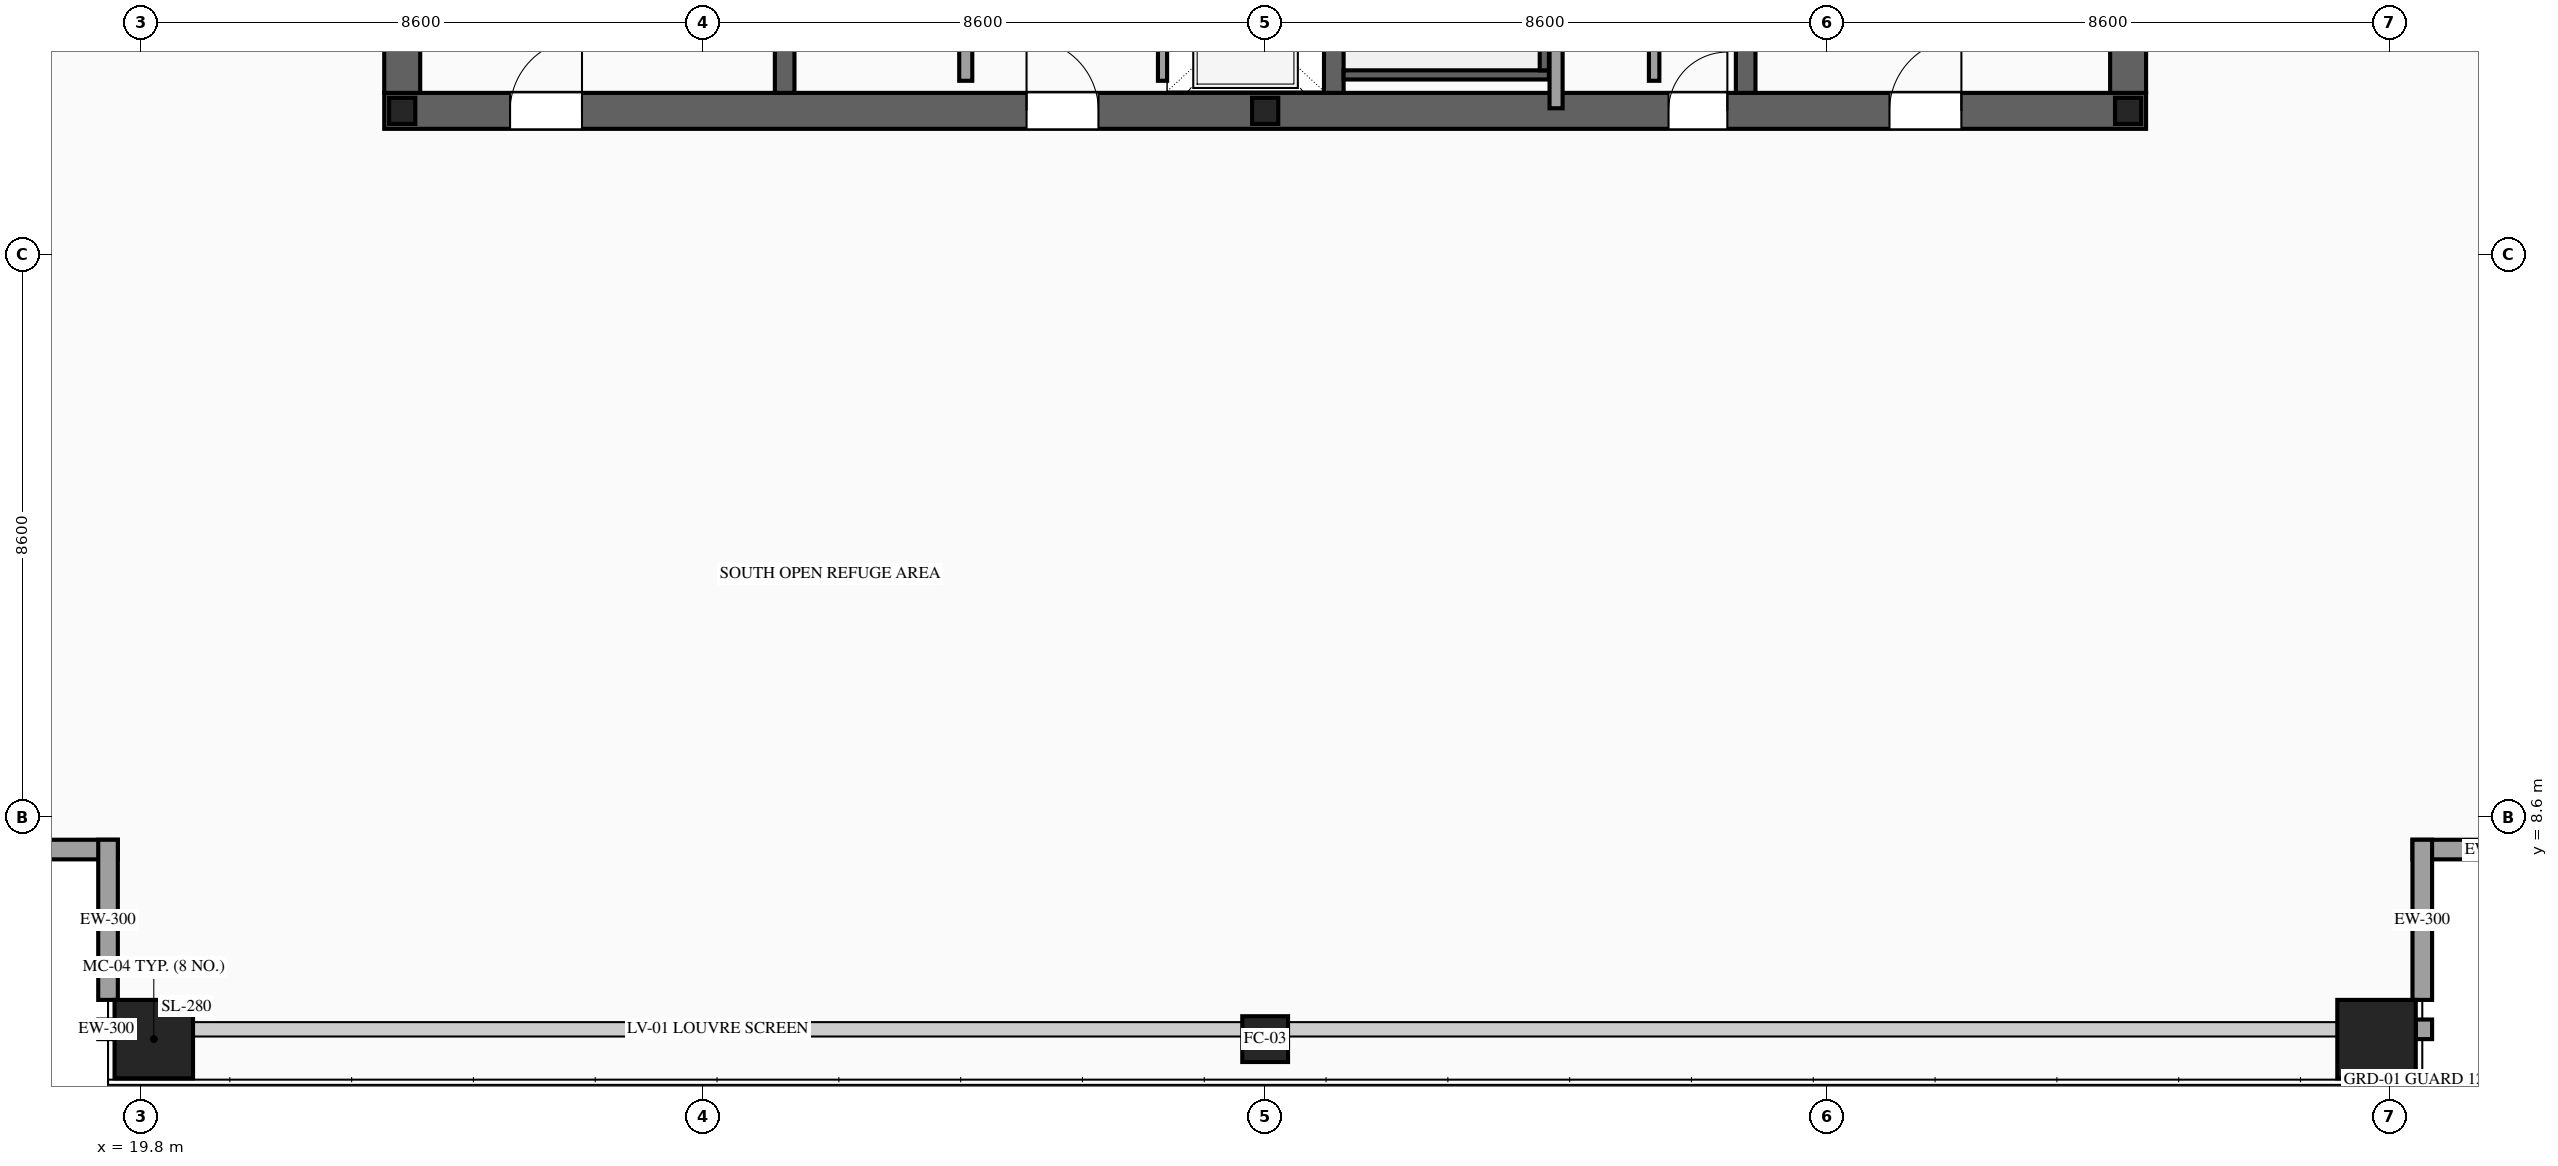
"""IFC4 building model, lengths in metres.
Left out: names, types, materials, properties, quantities, classifications, styles, units other than length and angle.
Written with IfcOpenShell. Run it as: python <this file> out.ifc"""

import sys

from ifc_helpers import new_model, si_unit, direction, frame, frame_2d, origin, origin_2d, place, context, subcontext, project, spatial, rectangle, hollow_rectangle, i_section, extrude, source, transform, mapped, element, fill, save


model = new_model("IFC4")
c1 = context("Model", 3, precision=1e-05, world=origin(), true_north=direction((0.0, 1.0)))
c2 = subcontext(c1, "Body", "Model", "MODEL_VIEW")
j1 = project(units=[si_unit("LENGTHUNIT", "METRE"), si_unit("PLANEANGLEUNIT", "RADIAN")], contexts=[c1])
p1 = place(None, origin())
s1 = spatial("IfcSite", under=j1, at=p1, CompositionType="ELEMENT")
p2 = place(p1, origin())
s2 = spatial("IfcBuilding", under=s1, at=p2, CompositionType="ELEMENT")
p3 = place(p2, frame((0.0, 0.0, 219.5)))
s3 = spatial("IfcBuildingStorey", under=s2, at=p3, CompositionType="ELEMENT", Elevation=219.5)
p4 = place(p3, frame((23.525, 19.4, 0.0), z_axis=(0.0, 0.0, 1.0), x_axis=(1.0, 0.0, 0.0)))
e1 = element("IfcWall", 1, at=p4, inside=s3, PredefinedType="SHEAR", context=c2, shape_type="SweptSolid", body=[
    extrude(rectangle(XDim=26.95, YDim=0.55, at=frame_2d((13.475, 0.0))), origin(), (0.0, 0.0, 1.0), 4.6),
])
p5 = place(p4, frame((1.925, 0.0, 0.0)))
e2 = element("IfcOpeningElement", 2, at=p5, cuts=e1, PredefinedType="OPENING", context=c2, shape_type="SweptSolid", body=[
    extrude(rectangle(XDim=1.1, YDim=2.2, at=frame_2d((0.55, 1.1))), frame((0.0, 0.29, 0.0), z_axis=(0.0, -1.0, 0.0), x_axis=(1.0, 0.0, 0.0)), (0.0, 0.0, 1.0), 0.58),
])
p6 = place(p4, frame((9.825, 0.0, 0.0)))
e3 = element("IfcOpeningElement", 3, at=p6, cuts=e1, PredefinedType="OPENING", context=c2, shape_type="SweptSolid", body=[
    extrude(rectangle(XDim=1.1, YDim=2.2, at=frame_2d((0.55, 1.1))), frame((0.0, 0.29, 0.0), z_axis=(0.0, -1.0, 0.0), x_axis=(1.0, 0.0, 0.0)), (0.0, 0.0, 1.0), 0.58),
])
p7 = place(p4, frame((23.025, 0.0, 0.0)))
e4 = element("IfcOpeningElement", 4, at=p7, cuts=e1, PredefinedType="OPENING", context=c2, shape_type="SweptSolid", body=[
    extrude(rectangle(XDim=1.1, YDim=2.2, at=frame_2d((0.55, 1.1))), frame((0.0, 0.29, 0.0), z_axis=(0.0, -1.0, 0.0), x_axis=(1.0, 0.0, 0.0)), (0.0, 0.0, 1.0), 0.58),
])
p8 = place(p4, frame((19.645, 0.0, 0.0)))
e5 = element("IfcOpeningElement", 5, at=p8, cuts=e1, PredefinedType="OPENING", context=c2, shape_type="SweptSolid", body=[
    extrude(rectangle(XDim=0.9, YDim=2.15, at=frame_2d((0.45, 1.075))), frame((0.0, 0.29, 0.0), z_axis=(0.0, -1.0, 0.0), x_axis=(1.0, 0.0, 0.0)), (0.0, 0.0, 1.0), 0.58),
])
m1 = source(origin(), c2, "Body", "SweptSolid", [
    extrude(rectangle(XDim=12.25, YDim=0.55, at=frame_2d((6.125, 0.0))), origin(), (0.0, 0.0, 1.0), 4.6),
])
for number, where, z_axis, x_axis in (
    (6, (23.8, 19.675, 0.0), (0.0, 0.0, 1.0), (0.0, 1.0, 0.0)),
    (7, (50.2, 19.675, 0.0), (0.0, 0.0, 1.0), (0.0, 1.0, 0.0)),
):
    element("IfcWall", number, at=place(p3, frame(where, z_axis=z_axis, x_axis=x_axis)), inside=s3, PredefinedType="SHEAR", context=c2, shape_type="MappedRepresentation", body=[
        mapped(m1, transform((0.0, 0.0, 0.0), scale=1.0)),
    ])
m2 = source(origin(), c2, "Body", "SweptSolid", [
    extrude(rectangle(XDim=12.25, YDim=0.3, at=frame_2d((6.125, 0.0))), origin(), (0.0, 0.0, 1.0), 4.6),
])
for number, where, z_axis, x_axis in (
    (8, (29.65, 19.675, 0.0), (0.0, 0.0, 1.0), (0.0, 1.0, 0.0)),
    (9, (38.05, 19.675, 0.0), (0.0, 0.0, 1.0), (0.0, 1.0, 0.0)),
    (10, (44.35, 19.675, 0.0), (0.0, 0.0, 1.0), (0.0, 1.0, 0.0)),
):
    element("IfcWall", number, at=place(p3, frame(where, z_axis=z_axis, x_axis=x_axis)), inside=s3, PredefinedType="SOLIDWALL", context=c2, shape_type="MappedRepresentation", body=[
        mapped(m2, transform((0.0, 0.0, 0.0), scale=1.0)),
    ])
m3 = source(origin(), c2, "Body", "SweptSolid", [
    extrude(i_section(OverallWidth=0.4, OverallDepth=0.4, WebThickness=0.013, FlangeThickness=0.021, at=origin_2d()), origin(), (0.0, 0.0, 1.0), 4.6),
])
for number, where, z_axis, x_axis in (
    (11, (23.8, 19.4, 0.0), (0.0, 0.0, 1.0), (1.0, 0.0, 0.0)),
    (12, (37.0, 19.4, 0.0), (0.0, 0.0, 1.0), (1.0, 0.0, 0.0)),
    (13, (50.2, 19.4, 0.0), (0.0, 0.0, 1.0), (1.0, 0.0, 0.0)),
):
    element("IfcColumn", number, at=place(p3, frame(where, z_axis=z_axis, x_axis=x_axis)), inside=s3, PredefinedType="COLUMN", context=c2, shape_type="MappedRepresentation", body=[
        mapped(m3, transform((0.0, 0.0, 0.0), scale=1.0)),
    ])
m4 = source(origin(), c2, "Body", "SweptSolid", [
    extrude(hollow_rectangle(XDim=1.2, YDim=1.2, WallThickness=0.055, at=origin_2d()), origin(), (0.0, 0.0, 1.0), 4.6),
])
p9 = place(p3, frame((20.0, 5.2, 0.0), z_axis=(0.0, 0.0, 1.0), x_axis=(1.0, 0.0, 0.0)))
e14 = element("IfcColumn", 14, at=p9, inside=s3, PredefinedType="COLUMN", context=c2, shape_type="MappedRepresentation", body=[
    mapped(m4, transform((0.0, 0.0, 0.0), scale=1.0)),
])
m5 = source(origin(), c2, "Body", "SweptSolid", [
    extrude(hollow_rectangle(XDim=0.7, YDim=0.7, WallThickness=0.032, at=origin_2d()), origin(), (0.0, 0.0, 1.0), 4.6),
])
p10 = place(p3, frame((37.0, 5.2, 0.0), z_axis=(0.0, 0.0, 1.0), x_axis=(1.0, 0.0, 0.0)))
e15 = element("IfcColumn", 15, at=p10, inside=s3, PredefinedType="COLUMN", context=c2, shape_type="MappedRepresentation", body=[
    mapped(m5, transform((0.0, 0.0, 0.0), scale=1.0)),
])
p11 = place(p3, frame((54.0, 5.2, 0.0), z_axis=(0.0, 0.0, 1.0), x_axis=(1.0, 0.0, 0.0)))
e16 = element("IfcColumn", 16, at=p11, inside=s3, PredefinedType="COLUMN", context=c2, shape_type="MappedRepresentation", body=[
    mapped(m4, transform((0.0, 0.0, 0.0), scale=1.0)),
])
m6 = source(origin(), c2, "Body", "SweptSolid", [
    extrude(rectangle(XDim=2.45, YDim=0.3, at=frame_2d((1.225, 0.0))), origin(), (0.0, 0.0, 1.0), 4.38),
])
for number, where, z_axis, x_axis in (
    (17, (17.0, 8.1, 0.0), (0.0, 0.0, 1.0), (1.0, 0.0, 0.0)),
    (18, (19.3, 8.25, 0.0), (0.0, 0.0, 1.0), (0.0, -1.0, 0.0)),
    (19, (54.55, 8.1, 0.0), (0.0, 0.0, 1.0), (1.0, 0.0, 0.0)),
    (20, (54.7, 5.8, 0.0), (0.0, 0.0, 1.0), (0.0, 1.0, 0.0)),
):
    element("IfcWall", number, at=place(p3, frame(where, z_axis=z_axis, x_axis=x_axis)), inside=s3, PredefinedType="SOLIDWALL", context=c2, shape_type="MappedRepresentation", body=[
        mapped(m6, transform((0.0, 0.0, 0.0), scale=1.0)),
    ])
m7 = source(origin(), c2, "Body", "SweptSolid", [
    extrude(rectangle(XDim=0.25, YDim=0.3, at=frame_2d((0.125, 0.0))), origin(), (0.0, 0.0, 1.0), 4.38),
])
for number, where, z_axis, x_axis in (
    (21, (19.15, 5.35, 0.0), (0.0, 0.0, 1.0), (1.0, 0.0, 0.0)),
    (22, (54.6, 5.35, 0.0), (0.0, 0.0, 1.0), (1.0, 0.0, 0.0)),
):
    element("IfcWall", number, at=place(p3, frame(where, z_axis=z_axis, x_axis=x_axis)), inside=s3, PredefinedType="SOLIDWALL", context=c2, shape_type="MappedRepresentation", body=[
        mapped(m7, transform((0.0, 0.0, 0.0), scale=1.0)),
    ])
p12 = place(p3, frame((35.43, 19.86, 0.0), z_axis=(0.0, 0.0, 1.0), x_axis=(0.0, 1.0, 0.0)))
e23 = element("IfcWall", 23, at=p12, inside=s3, PredefinedType="SOLIDWALL", context=c2, shape_type="SweptSolid", body=[
    extrude(rectangle(XDim=2.04, YDim=0.14, at=frame_2d((1.02, 0.0))), origin(), (0.0, 0.0, 1.0), 4.38),
])
p13 = place(p12, frame((0.47, 0.0, 0.0)))
e24 = element("IfcOpeningElement", 24, at=p13, cuts=e23, PredefinedType="OPENING", context=c2, shape_type="SweptSolid", body=[
    extrude(rectangle(XDim=1.1, YDim=2.2, at=frame_2d((0.55, 1.1))), frame((0.0, 0.085, 0.0), z_axis=(0.0, -1.0, 0.0), x_axis=(1.0, 0.0, 0.0)), (0.0, 0.0, 1.0), 0.17),
])
m8 = source(origin(), c2, "Body", "SweptSolid", [
    extrude(rectangle(XDim=3.14, YDim=0.14, at=frame_2d((1.57, 0.0))), origin(), (0.0, 0.0, 1.0), 4.38),
])
p14 = place(p3, frame((38.2, 19.95, 0.0), z_axis=(0.0, 0.0, 1.0), x_axis=(1.0, 0.0, 0.0)))
e25 = element("IfcWall", 25, at=p14, inside=s3, PredefinedType="SOLIDWALL", context=c2, shape_type="MappedRepresentation", body=[
    mapped(m8, transform((0.0, 0.0, 0.0), scale=1.0)),
])
m9 = source(origin(), c2, "Body", "SweptSolid", [
    extrude(rectangle(XDim=8.94, YDim=0.14, at=frame_2d((4.47, 0.0))), origin(), (0.0, 0.0, 1.0), 4.38),
])
p15 = place(p3, frame((41.27, 20.02, 0.0), z_axis=(0.0, 0.0, 1.0), x_axis=(0.0, 1.0, 0.0)))
e26 = element("IfcWall", 26, at=p15, inside=s3, PredefinedType="SOLIDWALL", context=c2, shape_type="MappedRepresentation", body=[
    mapped(m9, transform((0.0, 0.0, 0.0), scale=1.0)),
])
p16 = place(p3, frame((32.42, 19.86, 0.0), z_axis=(0.0, 0.0, 1.0), x_axis=(0.0, 1.0, 0.0)))
e27 = element("IfcWall", 27, at=p16, inside=s3, PredefinedType="PARTITIONING", context=c2, shape_type="SweptSolid", body=[
    extrude(rectangle(XDim=11.88, YDim=0.2, at=frame_2d((5.94, 0.0))), origin(), (0.0, 0.0, 1.0), 4.38),
])
p17 = place(p16, frame((5.49, 0.0, 0.0)))
e28 = element("IfcOpeningElement", 28, at=p17, cuts=e27, PredefinedType="OPENING", context=c2, shape_type="SweptSolid", body=[
    extrude(rectangle(XDim=0.9, YDim=2.15, at=frame_2d((0.45, 1.075))), frame((0.0, 0.115, 0.0), z_axis=(0.0, -1.0, 0.0), x_axis=(1.0, 0.0, 0.0)), (0.0, 0.0, 1.0), 0.23),
])
m10 = source(origin(), c2, "Body", "SweptSolid", [
    extrude(rectangle(XDim=1.34, YDim=0.16, at=frame_2d((0.67, 0.0))), origin(), (0.0, 0.0, 1.0), 4.38),
])
p18 = place(p3, frame((42.95, 19.86, 0.0), z_axis=(0.0, 0.0, 1.0), x_axis=(0.0, 1.0, 0.0)))
e29 = element("IfcWall", 29, at=p18, inside=s3, PredefinedType="PARTITIONING", context=c2, shape_type="MappedRepresentation", body=[
    mapped(m10, transform((0.0, 0.0, 0.0), scale=1.0)),
])
m11 = source(origin(), c2, "Body", "SweptSolid", [
    extrude(rectangle(XDim=12.72, YDim=0.2, at=frame_2d((6.36, 0.0))), origin(), (0.0, 0.0, 1.0), 4.38),
])
p19 = place(p3, frame((41.45, 19.44, 0.0), z_axis=(0.0, 0.0, 1.0), x_axis=(0.0, 1.0, 0.0)))
e30 = element("IfcWall", 30, at=p19, inside=s3, PredefinedType="PARTITIONING", context=c2, shape_type="MappedRepresentation", body=[
    mapped(m11, transform((0.0, 0.0, 0.0), scale=1.0)),
])
m12 = source(origin(), c2, "Body", "SweptSolid", [
    extrude(rectangle(XDim=1.1, YDim=2.2, at=frame_2d((0.55, 1.1))), frame((0.0, 0.025, 0.0), z_axis=(0.0, -1.0, 0.0), x_axis=(1.0, 0.0, 0.0)), (0.0, 0.0, 1.0), 0.05),
])
p20 = place(p5, origin())
e31 = element("IfcDoor", 31, at=p20, inside=s3, OperationType="SINGLE_SWING_RIGHT", PredefinedType="DOOR", context=c2, shape_type="MappedRepresentation", body=[
    mapped(m12, transform((0.0, 0.0, 0.0), scale=1.0)),
])
fill(e2, e31)
p21 = place(p6, origin())
e32 = element("IfcDoor", 32, at=p21, inside=s3, OperationType="SINGLE_SWING_LEFT", PredefinedType="DOOR", context=c2, shape_type="MappedRepresentation", body=[
    mapped(m12, transform((0.0, 0.0, 0.0), scale=1.0)),
])
fill(e3, e32)
p22 = place(p7, origin())
e33 = element("IfcDoor", 33, at=p22, inside=s3, OperationType="SINGLE_SWING_RIGHT", PredefinedType="DOOR", context=c2, shape_type="MappedRepresentation", body=[
    mapped(m12, transform((0.0, 0.0, 0.0), scale=1.0)),
])
fill(e4, e33)
m13 = source(origin(), c2, "Body", "SweptSolid", [
    extrude(rectangle(XDim=0.9, YDim=2.15, at=frame_2d((0.45, 1.075))), frame((0.0, 0.025, 0.0), z_axis=(0.0, -1.0, 0.0), x_axis=(1.0, 0.0, 0.0)), (0.0, 0.0, 1.0), 0.05),
])
p23 = place(p8, origin())
e34 = element("IfcDoor", 34, at=p23, inside=s3, OperationType="SINGLE_SWING_RIGHT", PredefinedType="DOOR", context=c2, shape_type="MappedRepresentation", body=[
    mapped(m13, transform((0.0, 0.0, 0.0), scale=1.0)),
])
fill(e5, e34)
save(model, sys.argv[1])
